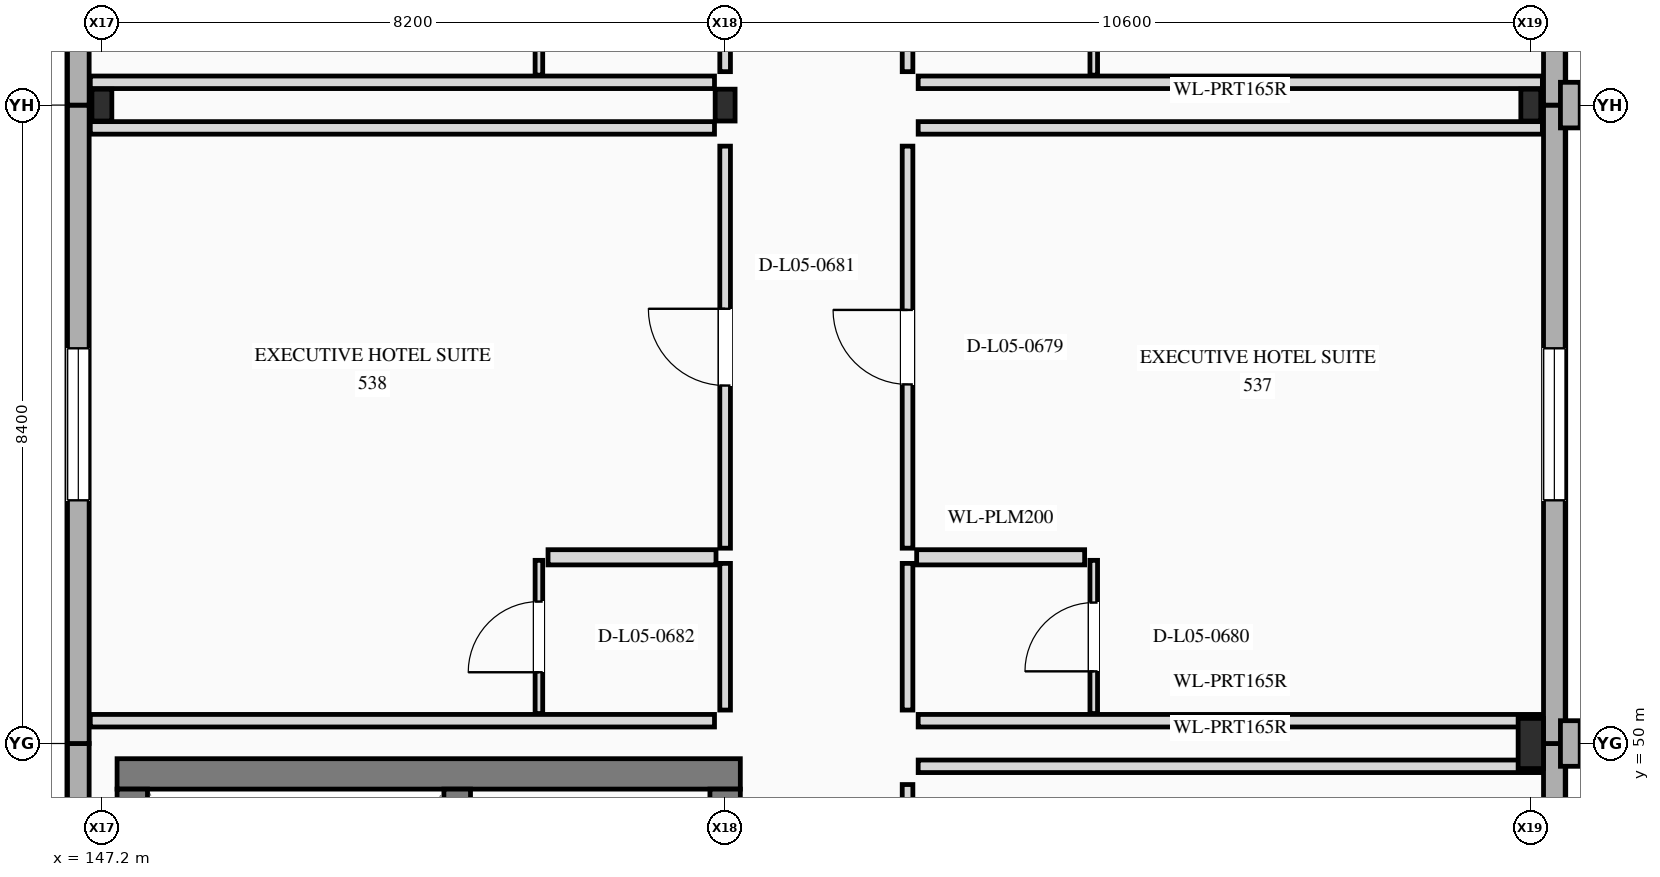
"""IFC4 building model, lengths in metres.
Left out: names, types, materials, properties, quantities, classifications, styles, units other than length and angle.
Written with IfcOpenShell. Run it as: python <this file> out.ifc"""

import sys

from ifc_helpers import new_model, si_unit, direction, frame, frame_2d, origin, origin_2d, place, context, subcontext, project, spatial, rectangle, i_section, extrude, element, fill, save


model = new_model("IFC4")
c1 = context("Model", 3, precision=1e-05, world=origin(), true_north=direction((0.0, 1.0)))
c2 = subcontext(c1, "Body", "Model", "MODEL_VIEW")
j1 = project(units=[si_unit("LENGTHUNIT", "METRE"), si_unit("PLANEANGLEUNIT", "RADIAN")], contexts=[c1])
p1 = place(None, origin())
s1 = spatial("IfcSite", under=j1, at=p1, CompositionType="ELEMENT")
p2 = place(p1, origin())
s2 = spatial("IfcBuilding", under=s1, at=p2, CompositionType="ELEMENT")
p3 = place(p2, frame((0.0, 0.0, 23.4)))
s3 = spatial("IfcBuildingStorey", under=s2, at=p3, CompositionType="ELEMENT", Elevation=23.4)
for number, where, z_axis, x_axis in (
    (1, (147.2, 58.4, 0.0), (0.0, 0.0, 1.0), (1.0, 0.0, 0.0)),
    (2, (155.4, 58.4, 0.0), (0.0, 0.0, 1.0), (1.0, 0.0, 0.0)),
):
    element("IfcColumn", number, at=place(p3, frame(where, z_axis=z_axis, x_axis=x_axis)), inside=s3, PredefinedType="COLUMN", context=c2, shape_type="SweptSolid", body=[
        extrude(i_section(OverallWidth=0.262, OverallDepth=0.419, WebThickness=0.012, FlangeThickness=0.019, at=origin_2d()), origin(), (0.0, 0.0, 1.0), 3.6),
    ])
p4 = place(p3, frame((166.0, 50.0, 0.0), z_axis=(0.0, 0.0, 1.0), x_axis=(1.0, 0.0, 0.0)))
e3 = element("IfcColumn", 3, at=p4, inside=s3, PredefinedType="COLUMN", context=c2, shape_type="SweptSolid", body=[
    extrude(i_section(OverallWidth=0.333, OverallDepth=0.66, WebThickness=0.024, FlangeThickness=0.044, at=origin_2d()), origin(), (0.0, 0.0, 1.0), 3.6),
])
p5 = place(p3, frame((166.0, 58.4, 0.0), z_axis=(0.0, 0.0, 1.0), x_axis=(1.0, 0.0, 0.0)))
e4 = element("IfcColumn", 4, at=p5, inside=s3, PredefinedType="COLUMN", context=c2, shape_type="SweptSolid", body=[
    extrude(i_section(OverallWidth=0.262, OverallDepth=0.419, WebThickness=0.012, FlangeThickness=0.019, at=origin_2d()), origin(), (0.0, 0.0, 1.0), 3.6),
])
p6 = place(p3, frame((166.31, 47.86, 0.0), z_axis=(0.0, 0.0, 1.0), x_axis=(0.0, 1.0, 0.0)))
e5 = element("IfcWall", 5, at=p6, inside=s3, PredefinedType="STANDARD", context=c2, shape_type="SweptSolid", body=[
    extrude(rectangle(XDim=2.14, YDim=0.285, at=frame_2d((1.07, 0.0))), origin(), (0.0, 0.0, 1.0), 3.6),
])
p7 = place(p3, frame((166.31, 50.0, 0.0), z_axis=(0.0, 0.0, 1.0), x_axis=(0.0, 1.0, 0.0)))
e6 = element("IfcWall", 6, at=p7, inside=s3, PredefinedType="STANDARD", context=c2, shape_type="SweptSolid", body=[
    extrude(rectangle(XDim=8.4, YDim=0.285, at=frame_2d((4.2, 0.0))), origin(), (0.0, 0.0, 1.0), 3.6),
])
p8 = place(p7, frame((3.2, 0.0, 0.85)))
e7 = element("IfcOpeningElement", 7, at=p8, cuts=e6, PredefinedType="OPENING", context=c2, shape_type="SweptSolid", body=[
    extrude(rectangle(XDim=2.0, YDim=1.65, at=frame_2d((1.0, 0.825))), frame((0.0, 0.152, 0.0), z_axis=(0.0, -1.0, 0.0), x_axis=(1.0, 0.0, 0.0)), (0.0, 0.0, 1.0), 0.305),
])
p9 = place(p3, frame((166.52, 49.7, 0.0), z_axis=(0.0, 0.0, 1.0), x_axis=(0.0, 1.0, 0.0)))
e8 = element("IfcWall", 8, at=p9, inside=s3, PredefinedType="ELEMENTEDWALL", context=c2, shape_type="SweptSolid", body=[
    extrude(rectangle(XDim=0.6, YDim=0.26, at=frame_2d((0.3, 0.0))), origin(), (0.0, 0.0, 1.0), 3.6),
])
p10 = place(p3, frame((166.31, 58.4, 0.0), z_axis=(0.0, 0.0, 1.0), x_axis=(0.0, 1.0, 0.0)))
e9 = element("IfcWall", 9, at=p10, inside=s3, PredefinedType="STANDARD", context=c2, shape_type="SweptSolid", body=[
    extrude(rectangle(XDim=8.71, YDim=0.285, at=frame_2d((4.355, 0.0))), origin(), (0.0, 0.0, 1.0), 3.6),
])
p11 = place(p10, frame((3.2, 0.0, 0.85)))
e10 = element("IfcOpeningElement", 10, at=p11, cuts=e9, PredefinedType="OPENING", context=c2, shape_type="SweptSolid", body=[
    extrude(rectangle(XDim=2.0, YDim=1.65, at=frame_2d((1.0, 0.825))), frame((0.0, 0.152, 0.0), z_axis=(0.0, -1.0, 0.0), x_axis=(1.0, 0.0, 0.0)), (0.0, 0.0, 1.0), 0.305),
])
p12 = place(p3, frame((166.52, 58.1, 0.0), z_axis=(0.0, 0.0, 1.0), x_axis=(0.0, 1.0, 0.0)))
e11 = element("IfcWall", 11, at=p12, inside=s3, PredefinedType="ELEMENTEDWALL", context=c2, shape_type="SweptSolid", body=[
    extrude(rectangle(XDim=0.6, YDim=0.26, at=frame_2d((0.3, 0.0))), origin(), (0.0, 0.0, 1.0), 3.6),
])
p13 = place(p3, frame((146.89, 41.6, 0.0), z_axis=(0.0, 0.0, 1.0), x_axis=(0.0, 1.0, 0.0)))
e12 = element("IfcWall", 12, at=p13, inside=s3, PredefinedType="STANDARD", context=c2, shape_type="SweptSolid", body=[
    extrude(rectangle(XDim=8.4, YDim=0.285, at=frame_2d((4.2, 0.0))), origin(), (0.0, 0.0, 1.0), 3.6),
])
p14 = place(p3, frame((146.89, 50.0, 0.0), z_axis=(0.0, 0.0, 1.0), x_axis=(0.0, 1.0, 0.0)))
e13 = element("IfcWall", 13, at=p14, inside=s3, PredefinedType="STANDARD", context=c2, shape_type="SweptSolid", body=[
    extrude(rectangle(XDim=8.4, YDim=0.285, at=frame_2d((4.2, 0.0))), origin(), (0.0, 0.0, 1.0), 3.6),
])
p15 = place(p14, frame((3.2, 0.0, 0.85)))
e14 = element("IfcOpeningElement", 14, at=p15, cuts=e13, PredefinedType="OPENING", context=c2, shape_type="SweptSolid", body=[
    extrude(rectangle(XDim=2.0, YDim=1.65, at=frame_2d((1.0, 0.825))), frame((0.0, 0.152, 0.0), z_axis=(0.0, -1.0, 0.0), x_axis=(1.0, 0.0, 0.0)), (0.0, 0.0, 1.0), 0.305),
])
p16 = place(p3, frame((146.89, 58.4, 0.0), z_axis=(0.0, 0.0, 1.0), x_axis=(0.0, 1.0, 0.0)))
e15 = element("IfcWall", 15, at=p16, inside=s3, PredefinedType="STANDARD", context=c2, shape_type="SweptSolid", body=[
    extrude(rectangle(XDim=8.71, YDim=0.285, at=frame_2d((4.355, 0.0))), origin(), (0.0, 0.0, 1.0), 3.6),
])
p17 = place(p16, frame((3.2, 0.0, 0.85)))
e16 = element("IfcOpeningElement", 16, at=p17, cuts=e15, PredefinedType="OPENING", context=c2, shape_type="SweptSolid", body=[
    extrude(rectangle(XDim=2.0, YDim=1.65, at=frame_2d((1.0, 0.825))), frame((0.0, 0.152, 0.0), z_axis=(0.0, -1.0, 0.0), x_axis=(1.0, 0.0, 0.0)), (0.0, 0.0, 1.0), 0.305),
])
p18 = place(p3, frame((155.6, 49.6, 0.0), z_axis=(0.0, 0.0, 1.0), x_axis=(-1.0, 0.0, 0.0)))
e17 = element("IfcWall", 17, at=p18, inside=s3, PredefinedType="SHEAR", context=c2, shape_type="SweptSolid", body=[
    extrude(rectangle(XDim=8.2, YDim=0.4, at=frame_2d((4.1, 0.0))), origin(), (0.0, 0.0, 1.0), 3.6),
])
p19 = place(p3, frame((147.6, 49.4, 0.0), z_axis=(0.0, 0.0, 1.0), x_axis=(0.0, -1.0, 0.0)))
e18 = element("IfcWall", 18, at=p19, inside=s3, PredefinedType="SHEAR", context=c2, shape_type="SweptSolid", body=[
    extrude(rectangle(XDim=9.4, YDim=0.4, at=frame_2d((4.7, 0.0))), origin(), (0.0, 0.0, 1.0), 3.6),
])
p20 = place(p3, frame((155.4, 40.0, 0.0), z_axis=(0.0, 0.0, 1.0), x_axis=(0.0, 1.0, 0.0)))
e19 = element("IfcWall", 19, at=p20, inside=s3, PredefinedType="SHEAR", context=c2, shape_type="SweptSolid", body=[
    extrude(rectangle(XDim=9.4, YDim=0.4, at=frame_2d((4.7, 0.0))), origin(), (0.0, 0.0, 1.0), 3.6),
])
p21 = place(p20, frame((1.05, 0.0, 0.0)))
e20 = element("IfcOpeningElement", 20, at=p21, cuts=e19, PredefinedType="OPENING", context=c2, shape_type="SweptSolid", body=[
    extrude(rectangle(XDim=1.1, YDim=2.2, at=frame_2d((0.55, 1.1))), frame((0.0, 0.21, 0.0), z_axis=(0.0, -1.0, 0.0), x_axis=(1.0, 0.0, 0.0)), (0.0, 0.0, 1.0), 0.42),
])
p22 = place(p20, frame((3.95, 0.0, 0.0)))
e21 = element("IfcOpeningElement", 21, at=p22, cuts=e19, PredefinedType="OPENING", context=c2, shape_type="SweptSolid", body=[
    extrude(rectangle(XDim=1.1, YDim=2.2, at=frame_2d((0.55, 1.1))), frame((0.0, 0.21, 0.0), z_axis=(0.0, -1.0, 0.0), x_axis=(1.0, 0.0, 0.0)), (0.0, 0.0, 1.0), 0.42),
])
p23 = place(p20, frame((6.875, 0.0, 0.0)))
e22 = element("IfcOpeningElement", 22, at=p23, cuts=e19, PredefinedType="OPENING", context=c2, shape_type="SweptSolid", body=[
    extrude(rectangle(XDim=1.35, YDim=2.3, at=frame_2d((0.675, 1.15))), frame((0.0, 0.21, 0.0), z_axis=(0.0, -1.0, 0.0), x_axis=(1.0, 0.0, 0.0)), (0.0, 0.0, 1.0), 0.42),
])
p24 = place(p3, frame((151.875, 40.0, 0.0), z_axis=(0.0, 0.0, 1.0), x_axis=(0.0, 1.0, 0.0)))
e23 = element("IfcWall", 23, at=p24, inside=s3, PredefinedType="SHEAR", context=c2, shape_type="SweptSolid", body=[
    extrude(rectangle(XDim=9.4, YDim=0.35, at=frame_2d((4.7, 0.0))), origin(), (0.0, 0.0, 1.0), 3.6),
])
p25 = place(p3, frame((157.8, 44.17, 0.0), z_axis=(0.0, 0.0, 1.0), x_axis=(0.0, 1.0, 0.0)))
e24 = element("IfcWall", 24, at=p25, inside=s3, PredefinedType="PARTITIONING", context=c2, shape_type="SweptSolid", body=[
    extrude(rectangle(XDim=5.29, YDim=0.14, at=frame_2d((2.645, 0.0))), origin(), (0.0, 0.0, 1.0), 2.853),
])
p26 = place(p25, frame((2.17, 0.0, 0.0)))
e25 = element("IfcOpeningElement", 25, at=p26, cuts=e24, PredefinedType="OPENING", context=c2, shape_type="SweptSolid", body=[
    extrude(rectangle(XDim=0.95, YDim=2.3, at=frame_2d((0.475, 1.15))), frame((0.0, 0.08, 0.0), z_axis=(0.0, -1.0, 0.0), x_axis=(1.0, 0.0, 0.0)), (0.0, 0.0, 1.0), 0.16),
])
p27 = place(p3, frame((157.94, 49.7, 0.0), z_axis=(0.0, 0.0, 1.0), x_axis=(1.0, 0.0, 0.0)))
e26 = element("IfcWall", 26, at=p27, inside=s3, PredefinedType="PARTITIONING", context=c2, shape_type="SweptSolid", body=[
    extrude(rectangle(XDim=8.213, YDim=0.165, at=frame_2d((4.106, 0.0))), origin(), (0.0, 0.0, 1.0), 2.69),
])
p28 = place(p3, frame((157.8, 50.44, 0.0), z_axis=(0.0, 0.0, 1.0), x_axis=(0.0, 1.0, 0.0)))
e27 = element("IfcWall", 27, at=p28, inside=s3, PredefinedType="PARTITIONING", context=c2, shape_type="SweptSolid", body=[
    extrude(rectangle(XDim=1.93, YDim=0.14, at=frame_2d((0.965, 0.0))), origin(), (0.0, 0.0, 1.0), 3.3),
])
p29 = place(p3, frame((157.8, 52.57, 0.0), z_axis=(0.0, 0.0, 1.0), x_axis=(0.0, 1.0, 0.0)))
e28 = element("IfcWall", 28, at=p29, inside=s3, PredefinedType="PARTITIONING", context=c2, shape_type="SweptSolid", body=[
    extrude(rectangle(XDim=5.29, YDim=0.14, at=frame_2d((2.645, 0.0))), origin(), (0.0, 0.0, 1.0), 3.3),
])
p30 = place(p29, frame((2.155, 0.0, 0.0)))
e29 = element("IfcOpeningElement", 29, at=p30, cuts=e28, PredefinedType="OPENING", context=c2, shape_type="SweptSolid", body=[
    extrude(rectangle(XDim=0.98, YDim=2.35, at=frame_2d((0.49, 1.175))), frame((0.0, 0.08, 0.0), z_axis=(0.0, -1.0, 0.0), x_axis=(1.0, 0.0, 0.0)), (0.0, 0.0, 1.0), 0.16),
])
for number, where, z_axis, x_axis in (
    (30, (157.94, 50.3, 0.0), (0.0, 0.0, 1.0), (1.0, 0.0, 0.0)),
    (31, (157.94, 58.1, 0.0), (0.0, 0.0, 1.0), (1.0, 0.0, 0.0)),
):
    element("IfcWall", number, at=place(p3, frame(where, z_axis=z_axis, x_axis=x_axis)), inside=s3, PredefinedType="PARTITIONING", context=c2, shape_type="SweptSolid", body=[
        extrude(rectangle(XDim=8.213, YDim=0.165, at=frame_2d((4.106, 0.0))), origin(), (0.0, 0.0, 1.0), 2.69),
    ])
p31 = place(p3, frame((157.92, 52.45, 0.0), z_axis=(0.0, 0.0, 1.0), x_axis=(1.0, 0.0, 0.0)))
e32 = element("IfcWall", 32, at=p31, inside=s3, PredefinedType="PLUMBINGWALL", context=c2, shape_type="SweptSolid", body=[
    extrude(rectangle(XDim=2.21, YDim=0.2, at=frame_2d((1.105, 0.0))), origin(), (0.0, 0.0, 1.0), 3.3),
])
p32 = place(p3, frame((160.25, 50.395, 0.0), z_axis=(0.0, 0.0, 1.0), x_axis=(0.0, 1.0, 0.0)))
e33 = element("IfcWall", 33, at=p32, inside=s3, PredefinedType="PARTITIONING", context=c2, shape_type="SweptSolid", body=[
    extrude(rectangle(XDim=2.015, YDim=0.1, at=frame_2d((1.008, 0.0))), origin(), (0.0, 0.0, 1.0), 3.3),
])
p33 = place(p32, frame((0.555, 0.0, 0.0)))
e34 = element("IfcOpeningElement", 34, at=p33, cuts=e33, PredefinedType="OPENING", context=c2, shape_type="SweptSolid", body=[
    extrude(rectangle(XDim=0.905, YDim=2.1, at=frame_2d((0.453, 1.05))), frame((0.0, 0.06, 0.0), z_axis=(0.0, -1.0, 0.0), x_axis=(1.0, 0.0, 0.0)), (0.0, 0.0, 1.0), 0.12),
])
p34 = place(p3, frame((155.4, 50.44, 0.0), z_axis=(0.0, 0.0, 1.0), x_axis=(0.0, 1.0, 0.0)))
e35 = element("IfcWall", 35, at=p34, inside=s3, PredefinedType="PARTITIONING", context=c2, shape_type="SweptSolid", body=[
    extrude(rectangle(XDim=1.93, YDim=0.14, at=frame_2d((0.965, 0.0))), origin(), (0.0, 0.0, 1.0), 2.69),
])
p35 = place(p3, frame((155.4, 52.57, 0.0), z_axis=(0.0, 0.0, 1.0), x_axis=(0.0, 1.0, 0.0)))
e36 = element("IfcWall", 36, at=p35, inside=s3, PredefinedType="PARTITIONING", context=c2, shape_type="SweptSolid", body=[
    extrude(rectangle(XDim=5.29, YDim=0.14, at=frame_2d((2.645, 0.0))), origin(), (0.0, 0.0, 1.0), 2.69),
])
p36 = place(p35, frame((2.14, 0.0, 0.0)))
e37 = element("IfcOpeningElement", 37, at=p36, cuts=e36, PredefinedType="OPENING", context=c2, shape_type="SweptSolid", body=[
    extrude(rectangle(XDim=1.01, YDim=2.35, at=frame_2d((0.505, 1.175))), frame((0.0, 0.08, 0.0), z_axis=(0.0, -1.0, 0.0), x_axis=(1.0, 0.0, 0.0)), (0.0, 0.0, 1.0), 0.16),
])
p37 = place(p3, frame((147.048, 50.3, 0.0), z_axis=(0.0, 0.0, 1.0), x_axis=(1.0, 0.0, 0.0)))
e38 = element("IfcWall", 38, at=p37, inside=s3, PredefinedType="PARTITIONING", context=c2, shape_type="SweptSolid", body=[
    extrude(rectangle(XDim=8.212, YDim=0.165, at=frame_2d((4.106, 0.0))), origin(), (0.0, 0.0, 1.0), 3.3),
])
p38 = place(p3, frame((147.048, 58.1, 0.0), z_axis=(0.0, 0.0, 1.0), x_axis=(1.0, 0.0, 0.0)))
e39 = element("IfcWall", 39, at=p38, inside=s3, PredefinedType="PARTITIONING", context=c2, shape_type="SweptSolid", body=[
    extrude(rectangle(XDim=8.212, YDim=0.165, at=frame_2d((4.106, 0.0))), origin(), (0.0, 0.0, 1.0), 2.713),
])
p39 = place(p3, frame((153.07, 52.45, 0.0), z_axis=(0.0, 0.0, 1.0), x_axis=(1.0, 0.0, 0.0)))
e40 = element("IfcWall", 40, at=p39, inside=s3, PredefinedType="PLUMBINGWALL", context=c2, shape_type="SweptSolid", body=[
    extrude(rectangle(XDim=2.21, YDim=0.2, at=frame_2d((1.105, 0.0))), origin(), (0.0, 0.0, 1.0), 3.3),
])
p40 = place(p3, frame((152.95, 50.395, 0.0), z_axis=(0.0, 0.0, 1.0), x_axis=(0.0, 1.0, 0.0)))
e41 = element("IfcWall", 41, at=p40, inside=s3, PredefinedType="PARTITIONING", context=c2, shape_type="SweptSolid", body=[
    extrude(rectangle(XDim=2.015, YDim=0.1, at=frame_2d((1.008, 0.0))), origin(), (0.0, 0.0, 1.0), 3.3),
])
p41 = place(p40, frame((0.543, 0.0, 0.0)))
e42 = element("IfcOpeningElement", 42, at=p41, cuts=e41, PredefinedType="OPENING", context=c2, shape_type="SweptSolid", body=[
    extrude(rectangle(XDim=0.93, YDim=2.14, at=frame_2d((0.465, 1.07))), frame((0.0, 0.06, 0.0), z_axis=(0.0, -1.0, 0.0), x_axis=(1.0, 0.0, 0.0)), (0.0, 0.0, 1.0), 0.12),
])
p42 = place(p3, frame((157.8, 58.84, 0.0), z_axis=(0.0, 0.0, 1.0), x_axis=(0.0, 1.0, 0.0)))
e43 = element("IfcWall", 43, at=p42, inside=s3, PredefinedType="PARTITIONING", context=c2, shape_type="SweptSolid", body=[
    extrude(rectangle(XDim=1.93, YDim=0.14, at=frame_2d((0.965, 0.0))), origin(), (0.0, 0.0, 1.0), 2.858),
])
p43 = place(p3, frame((157.94, 58.7, 0.0), z_axis=(0.0, 0.0, 1.0), x_axis=(1.0, 0.0, 0.0)))
e44 = element("IfcWall", 44, at=p43, inside=s3, PredefinedType="PARTITIONING", context=c2, shape_type="SweptSolid", body=[
    extrude(rectangle(XDim=8.213, YDim=0.165, at=frame_2d((4.106, 0.0))), origin(), (0.0, 0.0, 1.0), 2.69),
])
p44 = place(p3, frame((160.25, 58.794, 0.0), z_axis=(0.0, 0.0, 1.0), x_axis=(0.0, 1.0, 0.0)))
e45 = element("IfcWall", 45, at=p44, inside=s3, PredefinedType="PARTITIONING", context=c2, shape_type="SweptSolid", body=[
    extrude(rectangle(XDim=2.016, YDim=0.1, at=frame_2d((1.008, 0.0))), origin(), (0.0, 0.0, 1.0), 2.858),
])
p45 = place(p44, frame((0.53, 0.0, 0.0)))
e46 = element("IfcOpeningElement", 46, at=p45, cuts=e45, PredefinedType="OPENING", context=c2, shape_type="SweptSolid", body=[
    extrude(rectangle(XDim=0.955, YDim=2.14, at=frame_2d((0.478, 1.07))), frame((0.0, 0.06, 0.0), z_axis=(0.0, -1.0, 0.0), x_axis=(1.0, 0.0, 0.0)), (0.0, 0.0, 1.0), 0.12),
])
p46 = place(p3, frame((155.4, 58.84, 0.0), z_axis=(0.0, 0.0, 1.0), x_axis=(0.0, 1.0, 0.0)))
e47 = element("IfcWall", 47, at=p46, inside=s3, PredefinedType="PARTITIONING", context=c2, shape_type="SweptSolid", body=[
    extrude(rectangle(XDim=1.93, YDim=0.14, at=frame_2d((0.965, 0.0))), origin(), (0.0, 0.0, 1.0), 2.774),
])
p47 = place(p3, frame((147.048, 58.7, 0.0), z_axis=(0.0, 0.0, 1.0), x_axis=(1.0, 0.0, 0.0)))
e48 = element("IfcWall", 48, at=p47, inside=s3, PredefinedType="PARTITIONING", context=c2, shape_type="SweptSolid", body=[
    extrude(rectangle(XDim=8.212, YDim=0.165, at=frame_2d((4.106, 0.0))), origin(), (0.0, 0.0, 1.0), 2.713),
])
p48 = place(p3, frame((152.95, 58.794, 0.0), z_axis=(0.0, 0.0, 1.0), x_axis=(0.0, 1.0, 0.0)))
e49 = element("IfcWall", 49, at=p48, inside=s3, PredefinedType="PARTITIONING", context=c2, shape_type="SweptSolid", body=[
    extrude(rectangle(XDim=2.016, YDim=0.1, at=frame_2d((1.008, 0.0))), origin(), (0.0, 0.0, 1.0), 2.908),
])
p49 = place(p48, frame((0.568, 0.0, 0.0)))
e50 = element("IfcOpeningElement", 50, at=p49, cuts=e49, PredefinedType="OPENING", context=c2, shape_type="SweptSolid", body=[
    extrude(rectangle(XDim=0.88, YDim=2.18, at=frame_2d((0.44, 1.09))), frame((0.0, 0.06, 0.0), z_axis=(0.0, -1.0, 0.0), x_axis=(1.0, 0.0, 0.0)), (0.0, 0.0, 1.0), 0.12),
])
p50 = place(p8, origin())
e51 = element("IfcWindow", 51, at=p50, inside=s3, PartitioningType="SINGLE_PANEL", PredefinedType="WINDOW", context=c2, shape_type="SweptSolid", body=[
    extrude(rectangle(XDim=2.0, YDim=1.65, at=frame_2d((1.0, 0.825))), frame((0.0, 0.03, 0.0), z_axis=(0.0, -1.0, 0.0), x_axis=(1.0, 0.0, 0.0)), (0.0, 0.0, 1.0), 0.06),
])
fill(e7, e51)
p51 = place(p15, origin())
e52 = element("IfcWindow", 52, at=p51, inside=s3, PartitioningType="SINGLE_PANEL", PredefinedType="WINDOW", context=c2, shape_type="SweptSolid", body=[
    extrude(rectangle(XDim=2.0, YDim=1.65, at=frame_2d((1.0, 0.825))), frame((0.0, 0.03, 0.0), z_axis=(0.0, -1.0, 0.0), x_axis=(1.0, 0.0, 0.0)), (0.0, 0.0, 1.0), 0.06),
])
fill(e14, e52)
p52 = place(p30, origin())
e53 = element("IfcDoor", 53, at=p52, inside=s3, OperationType="SINGLE_SWING_RIGHT", PredefinedType="DOOR", context=c2, shape_type="SweptSolid", body=[
    extrude(rectangle(XDim=0.98, YDim=2.35, at=frame_2d((0.49, 1.175))), frame((0.0, 0.025, 0.0), z_axis=(0.0, -1.0, 0.0), x_axis=(1.0, 0.0, 0.0)), (0.0, 0.0, 1.0), 0.05),
])
fill(e29, e53)
p53 = place(p33, origin())
e54 = element("IfcDoor", 54, at=p53, inside=s3, OperationType="SINGLE_SWING_LEFT", PredefinedType="DOOR", context=c2, shape_type="SweptSolid", body=[
    extrude(rectangle(XDim=0.905, YDim=2.1, at=frame_2d((0.453, 1.05))), frame((0.0, 0.025, 0.0), z_axis=(0.0, -1.0, 0.0), x_axis=(1.0, 0.0, 0.0)), (0.0, 0.0, 1.0), 0.05),
])
fill(e34, e54)
p54 = place(p36, origin())
e55 = element("IfcDoor", 55, at=p54, inside=s3, OperationType="SINGLE_SWING_RIGHT", PredefinedType="DOOR", context=c2, shape_type="SweptSolid", body=[
    extrude(rectangle(XDim=1.01, YDim=2.35, at=frame_2d((0.505, 1.175))), frame((0.0, 0.025, 0.0), z_axis=(0.0, -1.0, 0.0), x_axis=(1.0, 0.0, 0.0)), (0.0, 0.0, 1.0), 0.05),
])
fill(e37, e55)
p55 = place(p41, origin())
e56 = element("IfcDoor", 56, at=p55, inside=s3, OperationType="SINGLE_SWING_LEFT", PredefinedType="DOOR", context=c2, shape_type="SweptSolid", body=[
    extrude(rectangle(XDim=0.93, YDim=2.14, at=frame_2d((0.465, 1.07))), frame((0.0, 0.025, 0.0), z_axis=(0.0, -1.0, 0.0), x_axis=(1.0, 0.0, 0.0)), (0.0, 0.0, 1.0), 0.05),
])
fill(e42, e56)
save(model, sys.argv[1])
